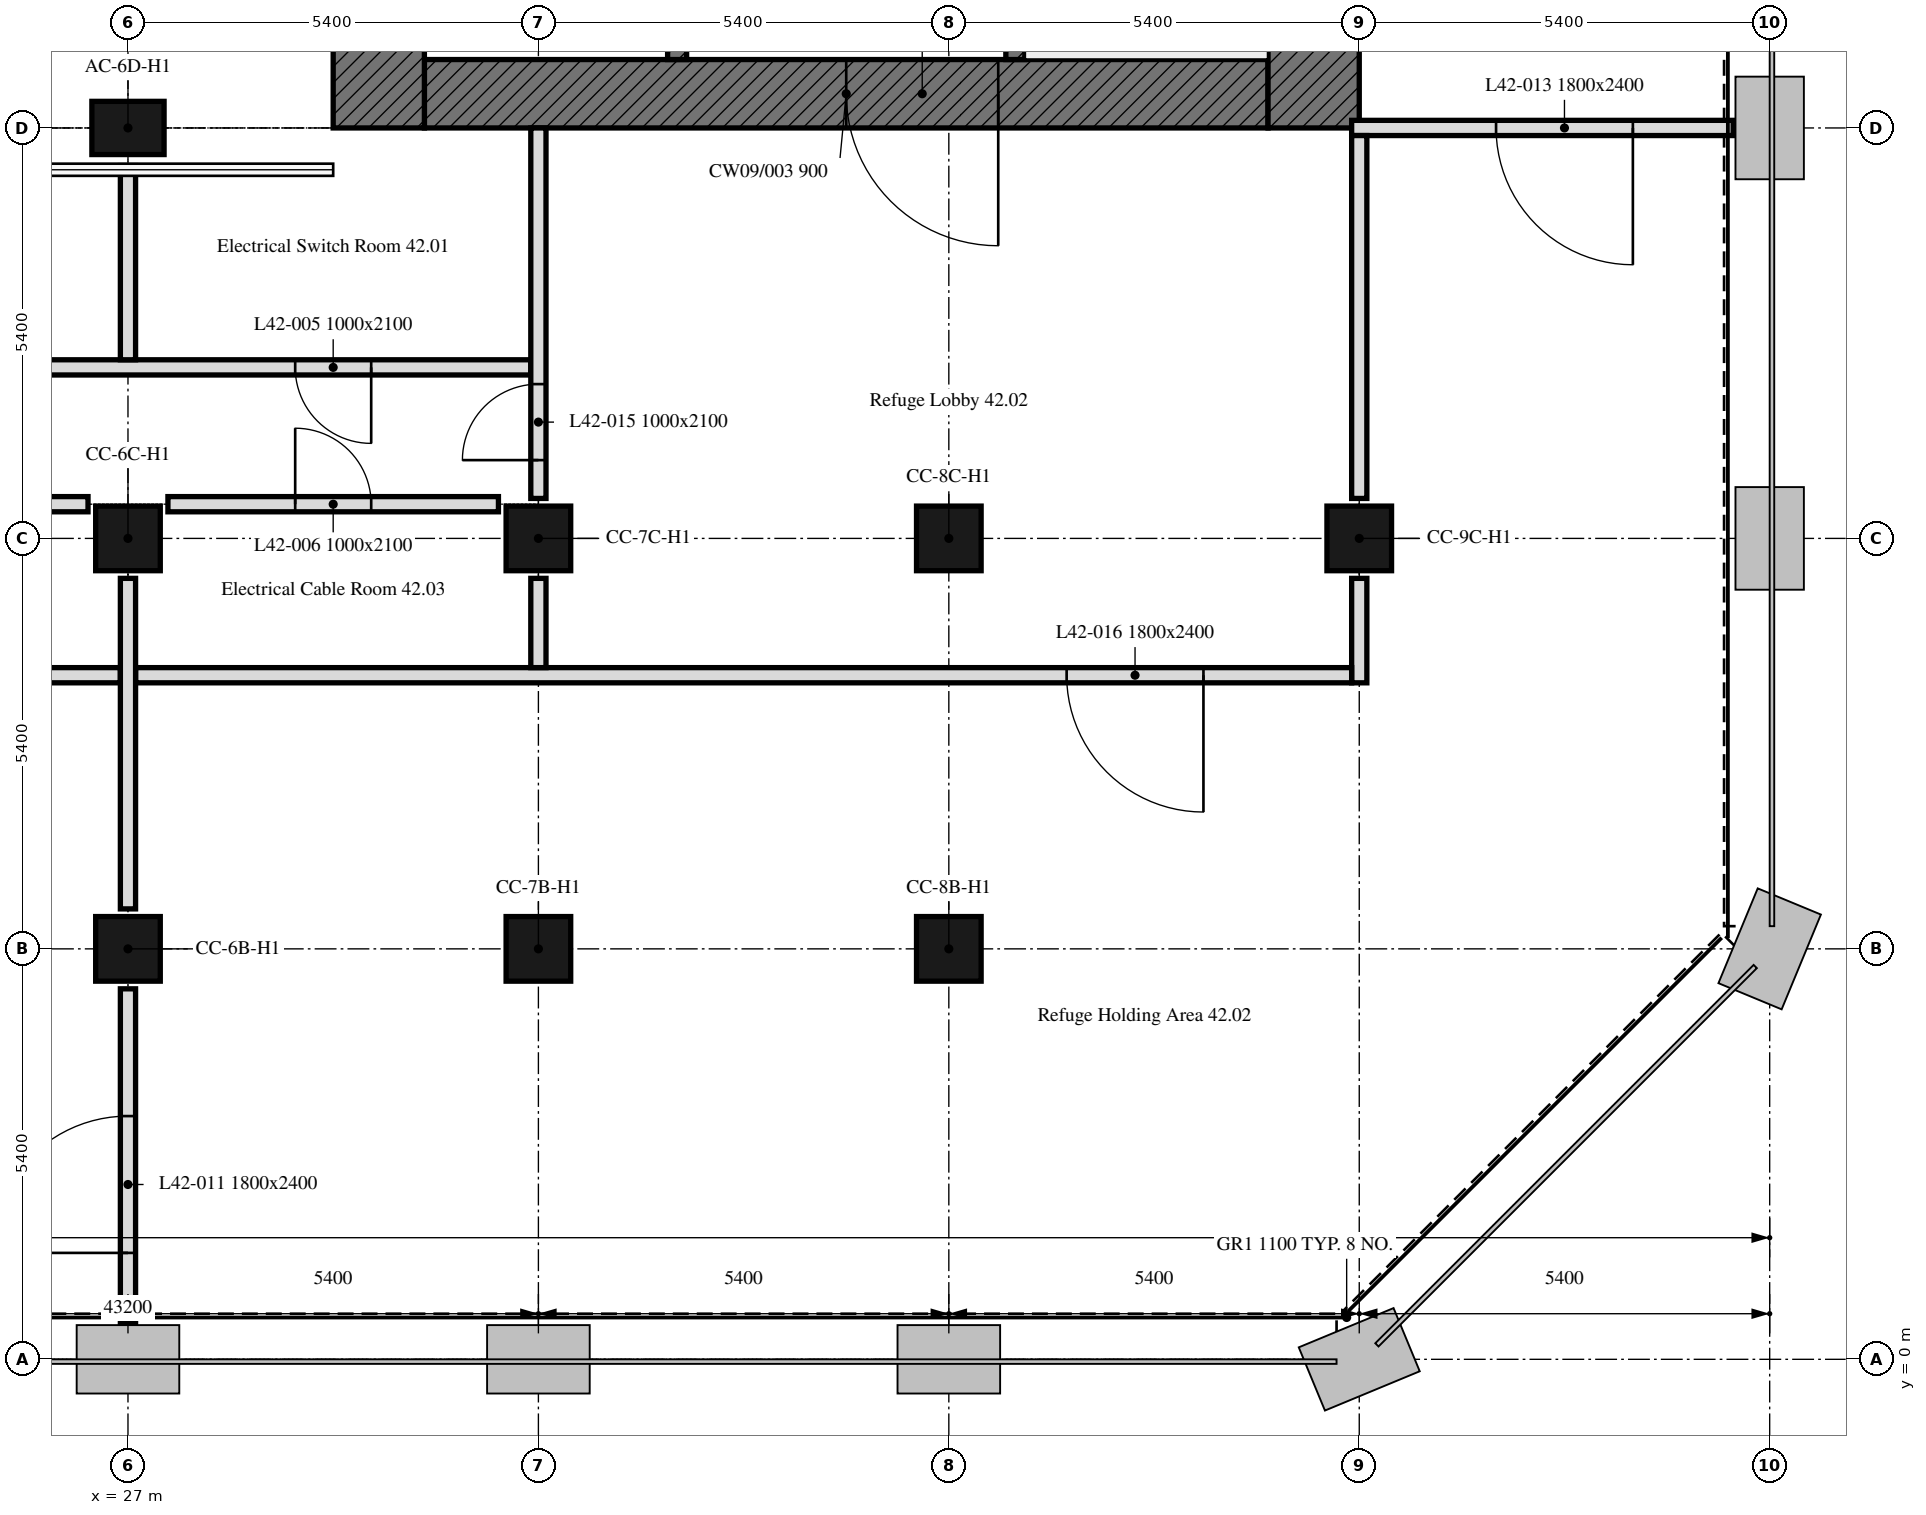
"""IFC4 building model, lengths in metres.
Left out: names, types, materials, properties, quantities, classifications, styles, units other than length and angle.
Written with IfcOpenShell. Run it as: python <this file> out.ifc"""

import sys

from ifc_helpers import new_model, si_unit, direction, frame, frame_2d, origin, origin_2d, place, context, subcontext, project, spatial, rectangle, extrude, element, fill, save


model = new_model("IFC4")
c1 = context("Model", 3, precision=1e-05, world=origin(), true_north=direction((0.0, 1.0)))
c2 = subcontext(c1, "Body", "Model", "MODEL_VIEW")
j1 = project(units=[si_unit("LENGTHUNIT", "METRE"), si_unit("PLANEANGLEUNIT", "RADIAN")], contexts=[c1])
p1 = place(None, origin())
s1 = spatial("IfcSite", under=j1, at=p1, CompositionType="ELEMENT")
p2 = place(p1, origin())
s2 = spatial("IfcBuilding", under=s1, at=p2, CompositionType="ELEMENT")
p3 = place(p2, frame((0.0, 0.0, 175.9)))
s3 = spatial("IfcBuildingStorey", under=s2, at=p3, CompositionType="ELEMENT", Elevation=175.9)
for number, where, z_axis, x_axis in (
    (1, (27.0, 5.4, 0.0), (0.0, 0.0, 1.0), (1.0, 0.0, 0.0)),
    (2, (32.4, 5.4, 0.0), (0.0, 0.0, 1.0), (1.0, 0.0, 0.0)),
    (3, (37.8, 5.4, 0.0), (0.0, 0.0, 1.0), (1.0, 0.0, 0.0)),
    (4, (27.0, 10.8, 0.0), (0.0, 0.0, 1.0), (1.0, 0.0, 0.0)),
    (5, (32.4, 10.8, 0.0), (0.0, 0.0, 1.0), (1.0, 0.0, 0.0)),
    (6, (37.8, 10.8, 0.0), (0.0, 0.0, 1.0), (1.0, 0.0, 0.0)),
    (7, (43.2, 10.8, 0.0), (0.0, 0.0, 1.0), (1.0, 0.0, 0.0)),
):
    element("IfcColumn", number, at=place(p3, frame(where, z_axis=z_axis, x_axis=x_axis)), inside=s3, PredefinedType="COLUMN", context=c2, shape_type="SweptSolid", body=[
        extrude(rectangle(XDim=0.85, YDim=0.85, at=origin_2d()), origin(), (0.0, 0.0, 1.0), 4.5),
    ])
p4 = place(p3, frame((27.0, 16.2, 0.0), z_axis=(0.0, 0.0, 1.0), x_axis=(1.0, 0.0, 0.0)))
e8 = element("IfcColumn", 8, at=p4, inside=s3, PredefinedType="COLUMN", context=c2, shape_type="SweptSolid", body=[
    extrude(rectangle(XDim=0.95, YDim=0.7, at=origin_2d()), origin(), (0.0, 0.0, 1.0), 4.5),
])
p5 = place(p3, frame((42.0, 16.65, 0.0), z_axis=(0.0, 0.0, 1.0), x_axis=(-1.0, 0.0, 0.0)))
e9 = element("IfcWall", 9, at=p5, inside=s3, PredefinedType="SOLIDWALL", context=c2, shape_type="SweptSolid", body=[
    extrude(rectangle(XDim=11.1, YDim=0.9, at=frame_2d((5.55, 0.0))), origin(), (0.0, 0.0, 1.0), 4.5),
])
p6 = place(p5, frame((3.55, 0.0, 0.0)))
e10 = element("IfcOpeningElement", 10, at=p6, cuts=e9, PredefinedType="OPENING", context=c2, shape_type="SweptSolid", body=[
    extrude(rectangle(XDim=2.0, YDim=2.4, at=frame_2d((1.0, 1.2))), frame((0.0, 0.45, 0.0), z_axis=(0.0, -1.0, 0.0), x_axis=(1.0, 0.0, 0.0)), (0.0, 0.0, 1.0), 0.9),
])
for number, where, z_axis, x_axis in (
    (11, (42.6, 32.4, 0.0), (0.0, 0.0, 1.0), (0.0, -1.0, 0.0)),
    (12, (30.3, 16.2, 0.0), (0.0, 0.0, 1.0), (0.0, 1.0, 0.0)),
):
    element("IfcWall", number, at=place(p3, frame(where, z_axis=z_axis, x_axis=x_axis)), inside=s3, PredefinedType="SOLIDWALL", context=c2, shape_type="SweptSolid", body=[
        extrude(rectangle(XDim=16.2, YDim=1.2, at=frame_2d((8.1, 0.0))), origin(), (0.0, 0.0, 1.0), 4.5),
    ])
p7 = place(p3, frame((38.675, 17.1, 0.0), z_axis=(0.0, 0.0, 1.0), x_axis=(0.0, 1.0, 0.0)))
e13 = element("IfcWall", 13, at=p7, inside=s3, PredefinedType="SOLIDWALL", context=c2, shape_type="SweptSolid", body=[
    extrude(rectangle(XDim=14.4, YDim=0.25, at=frame_2d((7.2, 0.0))), origin(), (0.0, 0.0, 1.0), 4.5),
])
p8 = place(p7, frame((4.6, 0.0, 0.0)))
e14 = element("IfcOpeningElement", 14, at=p8, cuts=e13, PredefinedType="OPENING", context=c2, shape_type="SweptSolid", body=[
    extrude(rectangle(XDim=1.0, YDim=2.1, at=frame_2d((0.5, 1.05))), frame((0.0, 0.125, 0.0), z_axis=(0.0, -1.0, 0.0), x_axis=(1.0, 0.0, 0.0)), (0.0, 0.0, 1.0), 0.25),
])
p9 = place(p7, frame((7.062, 0.0, 0.0)))
e15 = element("IfcOpeningElement", 15, at=p9, cuts=e13, PredefinedType="OPENING", context=c2, shape_type="SweptSolid", body=[
    extrude(rectangle(XDim=1.2, YDim=2.1, at=frame_2d((0.6, 1.05))), frame((0.0, 0.125, 0.0), z_axis=(0.0, -1.0, 0.0), x_axis=(1.0, 0.0, 0.0)), (0.0, 0.0, 1.0), 0.25),
])
p10 = place(p7, frame((9.853, 0.0, 0.0)))
e16 = element("IfcOpeningElement", 16, at=p10, cuts=e13, PredefinedType="OPENING", context=c2, shape_type="SweptSolid", body=[
    extrude(rectangle(XDim=0.9, YDim=2.1, at=frame_2d((0.45, 1.05))), frame((0.0, 0.125, 0.0), z_axis=(0.0, -1.0, 0.0), x_axis=(1.0, 0.0, 0.0)), (0.0, 0.0, 1.0), 0.25),
])
p11 = place(p7, frame((11.667, 0.0, 0.0)))
e17 = element("IfcOpeningElement", 17, at=p11, cuts=e13, PredefinedType="OPENING", context=c2, shape_type="SweptSolid", body=[
    extrude(rectangle(XDim=0.9, YDim=2.1, at=frame_2d((0.45, 1.05))), frame((0.0, 0.125, 0.0), z_axis=(0.0, -1.0, 0.0), x_axis=(1.0, 0.0, 0.0)), (0.0, 0.0, 1.0), 0.25),
])
p12 = place(p7, frame((13.227, 0.0, 0.0)))
e18 = element("IfcOpeningElement", 18, at=p12, cuts=e13, PredefinedType="OPENING", context=c2, shape_type="SweptSolid", body=[
    extrude(rectangle(XDim=0.9, YDim=2.1, at=frame_2d((0.45, 1.05))), frame((0.0, 0.125, 0.0), z_axis=(0.0, -1.0, 0.0), x_axis=(1.0, 0.0, 0.0)), (0.0, 0.0, 1.0), 0.25),
])
p13 = place(p3, frame((34.225, 17.1, 0.0), z_axis=(0.0, 0.0, 1.0), x_axis=(0.0, 1.0, 0.0)))
e19 = element("IfcWall", 19, at=p13, inside=s3, PredefinedType="SOLIDWALL", context=c2, shape_type="SweptSolid", body=[
    extrude(rectangle(XDim=14.4, YDim=0.25, at=frame_2d((7.2, 0.0))), origin(), (0.0, 0.0, 1.0), 4.5),
])
p14 = place(p13, frame((13.15, 0.0, 0.0)))
e20 = element("IfcOpeningElement", 20, at=p14, cuts=e19, PredefinedType="OPENING", context=c2, shape_type="SweptSolid", body=[
    extrude(rectangle(XDim=1.0, YDim=2.1, at=frame_2d((0.5, 1.05))), frame((0.0, 0.125, 0.0), z_axis=(0.0, -1.0, 0.0), x_axis=(1.0, 0.0, 0.0)), (0.0, 0.0, 1.0), 0.25),
])
p15 = place(p13, frame((3.25, 0.0, 0.0)))
e21 = element("IfcOpeningElement", 21, at=p15, cuts=e19, PredefinedType="OPENING", context=c2, shape_type="SweptSolid", body=[
    extrude(rectangle(XDim=0.9, YDim=2.1, at=frame_2d((0.45, 1.05))), frame((0.0, 0.125, 0.0), z_axis=(0.0, -1.0, 0.0), x_axis=(1.0, 0.0, 0.0)), (0.0, 0.0, 1.0), 0.25),
])
p16 = place(p3, frame((22.126, 11.25, 0.0), z_axis=(0.0, 0.0, 1.0), x_axis=(1.0, 0.0, 0.0)))
e22 = element("IfcWall", 22, at=p16, inside=s3, PredefinedType="PARTITIONING", context=c2, shape_type="SweptSolid", body=[
    extrude(rectangle(XDim=4.349, YDim=0.2, at=frame_2d((2.174, 0.0))), origin(), (0.0, 0.0, 1.0), 4.5),
])
p17 = place(p16, frame((1.674, 0.0, 0.0)))
e23 = element("IfcOpeningElement", 23, at=p17, cuts=e22, PredefinedType="OPENING", context=c2, shape_type="SweptSolid", body=[
    extrude(rectangle(XDim=1.0, YDim=2.1, at=frame_2d((0.5, 1.05))), frame((0.0, 0.1, 0.0), z_axis=(0.0, -1.0, 0.0), x_axis=(1.0, 0.0, 0.0)), (0.0, 0.0, 1.0), 0.2),
])
p18 = place(p3, frame((27.526, 11.25, 0.0), z_axis=(0.0, 0.0, 1.0), x_axis=(1.0, 0.0, 0.0)))
e24 = element("IfcWall", 24, at=p18, inside=s3, PredefinedType="PARTITIONING", context=c2, shape_type="SweptSolid", body=[
    extrude(rectangle(XDim=4.349, YDim=0.2, at=frame_2d((2.174, 0.0))), origin(), (0.0, 0.0, 1.0), 4.5),
])
p19 = place(p18, frame((1.674, 0.0, 0.0)))
e25 = element("IfcOpeningElement", 25, at=p19, cuts=e24, PredefinedType="OPENING", context=c2, shape_type="SweptSolid", body=[
    extrude(rectangle(XDim=1.0, YDim=2.1, at=frame_2d((0.5, 1.05))), frame((0.0, 0.1, 0.0), z_axis=(0.0, -1.0, 0.0), x_axis=(1.0, 0.0, 0.0)), (0.0, 0.0, 1.0), 0.2),
])
p20 = place(p3, frame((32.3, 13.05, 0.0), z_axis=(0.0, 0.0, 1.0), x_axis=(-1.0, 0.0, 0.0)))
e26 = element("IfcWall", 26, at=p20, inside=s3, PredefinedType="PARTITIONING", context=c2, shape_type="SweptSolid", body=[
    extrude(rectangle(XDim=16.0, YDim=0.2, at=frame_2d((8.0, 0.0))), origin(), (0.0, 0.0, 1.0), 3.9),
])
p21 = place(p20, frame((12.9, 0.0, 0.0)))
e27 = element("IfcOpeningElement", 27, at=p21, cuts=e26, PredefinedType="OPENING", context=c2, shape_type="SweptSolid", body=[
    extrude(rectangle(XDim=1.0, YDim=2.1, at=frame_2d((0.5, 1.05))), frame((0.0, 0.1, 0.0), z_axis=(0.0, -1.0, 0.0), x_axis=(1.0, 0.0, 0.0)), (0.0, 0.0, 1.0), 0.2),
])
p22 = place(p20, frame((7.5, 0.0, 0.0)))
e28 = element("IfcOpeningElement", 28, at=p22, cuts=e26, PredefinedType="OPENING", context=c2, shape_type="SweptSolid", body=[
    extrude(rectangle(XDim=1.0, YDim=2.1, at=frame_2d((0.5, 1.05))), frame((0.0, 0.1, 0.0), z_axis=(0.0, -1.0, 0.0), x_axis=(1.0, 0.0, 0.0)), (0.0, 0.0, 1.0), 0.2),
])
p23 = place(p20, frame((2.1, 0.0, 0.0)))
e29 = element("IfcOpeningElement", 29, at=p23, cuts=e26, PredefinedType="OPENING", context=c2, shape_type="SweptSolid", body=[
    extrude(rectangle(XDim=1.0, YDim=2.1, at=frame_2d((0.5, 1.05))), frame((0.0, 0.1, 0.0), z_axis=(0.0, -1.0, 0.0), x_axis=(1.0, 0.0, 0.0)), (0.0, 0.0, 1.0), 0.2),
])
p24 = place(p3, frame((27.0, 0.48, 0.0), z_axis=(0.0, 0.0, 1.0), x_axis=(0.0, 1.0, 0.0)))
e30 = element("IfcWall", 30, at=p24, inside=s3, PredefinedType="PARTITIONING", context=c2, shape_type="SweptSolid", body=[
    extrude(rectangle(XDim=4.394, YDim=0.2, at=frame_2d((2.197, 0.0))), origin(), (0.0, 0.0, 1.0), 3.9),
])
p25 = place(p24, frame((0.92, 0.0, 0.0)))
e31 = element("IfcOpeningElement", 31, at=p25, cuts=e30, PredefinedType="OPENING", context=c2, shape_type="SweptSolid", body=[
    extrude(rectangle(XDim=1.8, YDim=2.4, at=frame_2d((0.9, 1.2))), frame((0.0, 0.1, 0.0), z_axis=(0.0, -1.0, 0.0), x_axis=(1.0, 0.0, 0.0)), (0.0, 0.0, 1.0), 0.2),
])
p26 = place(p3, frame((26.9, 9.0, 0.0), z_axis=(0.0, 0.0, 1.0), x_axis=(-1.0, 0.0, 0.0)))
e32 = element("IfcWall", 32, at=p26, inside=s3, PredefinedType="PARTITIONING", context=c2, shape_type="SweptSolid", body=[
    extrude(rectangle(XDim=21.25, YDim=0.2, at=frame_2d((10.625, 0.0))), origin(), (0.0, 0.0, 1.0), 3.9),
])
p27 = place(p26, frame((12.75, 0.0, 0.0)))
e33 = element("IfcOpeningElement", 33, at=p27, cuts=e32, PredefinedType="OPENING", context=c2, shape_type="SweptSolid", body=[
    extrude(rectangle(XDim=1.8, YDim=2.4, at=frame_2d((0.9, 1.2))), frame((0.0, 0.1, 0.0), z_axis=(0.0, -1.0, 0.0), x_axis=(1.0, 0.0, 0.0)), (0.0, 0.0, 1.0), 0.2),
])
p28 = place(p3, frame((48.12, 16.2, 0.0), z_axis=(0.0, 0.0, 1.0), x_axis=(-1.0, 0.0, 0.0)))
e34 = element("IfcWall", 34, at=p28, inside=s3, PredefinedType="PARTITIONING", context=c2, shape_type="SweptSolid", body=[
    extrude(rectangle(XDim=5.02, YDim=0.2, at=frame_2d((2.51, 0.0))), origin(), (0.0, 0.0, 1.0), 3.9),
])
p29 = place(p28, frame((1.32, 0.0, 0.0)))
e35 = element("IfcOpeningElement", 35, at=p29, cuts=e34, PredefinedType="OPENING", context=c2, shape_type="SweptSolid", body=[
    extrude(rectangle(XDim=1.8, YDim=2.4, at=frame_2d((0.9, 1.2))), frame((0.0, 0.1, 0.0), z_axis=(0.0, -1.0, 0.0), x_axis=(1.0, 0.0, 0.0)), (0.0, 0.0, 1.0), 0.2),
])
p30 = place(p3, frame((43.2, 16.1, 0.0), z_axis=(0.0, 0.0, 1.0), x_axis=(0.0, -1.0, 0.0)))
e36 = element("IfcWall", 36, at=p30, inside=s3, PredefinedType="PARTITIONING", context=c2, shape_type="SweptSolid", body=[
    extrude(rectangle(XDim=4.774, YDim=0.2, at=frame_2d((2.387, 0.0))), origin(), (0.0, 0.0, 1.0), 4.5),
])
p31 = place(p3, frame((43.2, 10.274, 0.0), z_axis=(0.0, 0.0, 1.0), x_axis=(0.0, -1.0, 0.0)))
e37 = element("IfcWall", 37, at=p31, inside=s3, PredefinedType="PARTITIONING", context=c2, shape_type="SweptSolid", body=[
    extrude(rectangle(XDim=1.375, YDim=0.2, at=frame_2d((0.687, 0.0))), origin(), (0.0, 0.0, 1.0), 4.5),
])
p32 = place(p3, frame((43.1, 9.0, 0.0), z_axis=(0.0, 0.0, 1.0), x_axis=(-1.0, 0.0, 0.0)))
e38 = element("IfcWall", 38, at=p32, inside=s3, PredefinedType="PARTITIONING", context=c2, shape_type="SweptSolid", body=[
    extrude(rectangle(XDim=16.0, YDim=0.2, at=frame_2d((8.0, 0.0))), origin(), (0.0, 0.0, 1.0), 3.9),
])
p33 = place(p32, frame((1.95, 0.0, 0.0)))
e39 = element("IfcOpeningElement", 39, at=p33, cuts=e38, PredefinedType="OPENING", context=c2, shape_type="SweptSolid", body=[
    extrude(rectangle(XDim=1.8, YDim=2.4, at=frame_2d((0.9, 1.2))), frame((0.0, 0.1, 0.0), z_axis=(0.0, -1.0, 0.0), x_axis=(1.0, 0.0, 0.0)), (0.0, 0.0, 1.0), 0.2),
])
p34 = place(p3, frame((32.4, 11.326, 0.0), z_axis=(0.0, 0.0, 1.0), x_axis=(0.0, 1.0, 0.0)))
e40 = element("IfcWall", 40, at=p34, inside=s3, PredefinedType="PARTITIONING", context=c2, shape_type="SweptSolid", body=[
    extrude(rectangle(XDim=4.874, YDim=0.2, at=frame_2d((2.437, 0.0))), origin(), (0.0, 0.0, 1.0), 3.9),
])
p35 = place(p34, frame((0.504, 0.0, 0.0)))
e41 = element("IfcOpeningElement", 41, at=p35, cuts=e40, PredefinedType="OPENING", context=c2, shape_type="SweptSolid", body=[
    extrude(rectangle(XDim=1.0, YDim=2.1, at=frame_2d((0.5, 1.05))), frame((0.0, 0.1, 0.0), z_axis=(0.0, -1.0, 0.0), x_axis=(1.0, 0.0, 0.0)), (0.0, 0.0, 1.0), 0.2),
])
p36 = place(p3, frame((32.4, 10.274, 0.0), z_axis=(0.0, 0.0, 1.0), x_axis=(0.0, -1.0, 0.0)))
e42 = element("IfcWall", 42, at=p36, inside=s3, PredefinedType="PARTITIONING", context=c2, shape_type="SweptSolid", body=[
    extrude(rectangle(XDim=1.174, YDim=0.2, at=frame_2d((0.587, 0.0))), origin(), (0.0, 0.0, 1.0), 3.9),
])
p37 = place(p3, frame((27.0, 13.15, 0.0), z_axis=(0.0, 0.0, 1.0), x_axis=(0.0, 1.0, 0.0)))
e43 = element("IfcWall", 43, at=p37, inside=s3, PredefinedType="PARTITIONING", context=c2, shape_type="SweptSolid", body=[
    extrude(rectangle(XDim=2.555, YDim=0.2, at=frame_2d((1.278, 0.0))), origin(), (0.0, 0.0, 1.0), 3.9),
])
p38 = place(p3, frame((27.0, 5.926, 0.0), z_axis=(0.0, 0.0, 1.0), x_axis=(0.0, 1.0, 0.0)))
e44 = element("IfcWall", 44, at=p38, inside=s3, PredefinedType="PARTITIONING", context=c2, shape_type="SweptSolid", body=[
    extrude(rectangle(XDim=4.349, YDim=0.2, at=frame_2d((2.174, 0.0))), origin(), (0.0, 0.0, 1.0), 3.9),
])
p39 = place(p6, origin())
e45 = element("IfcDoor", 45, at=p39, inside=s3, OperationType="DOUBLE_DOOR_SINGLE_SWING", PredefinedType="DOOR", context=c2, shape_type="SweptSolid", body=[
    extrude(rectangle(XDim=2.0, YDim=2.4, at=frame_2d((1.0, 1.2))), frame((0.0, 0.025, 0.0), z_axis=(0.0, -1.0, 0.0), x_axis=(1.0, 0.0, 0.0)), (0.0, 0.0, 1.0), 0.05),
])
fill(e10, e45)
p40 = place(p23, origin())
e46 = element("IfcDoor", 46, at=p40, inside=s3, OperationType="SINGLE_SWING_LEFT", PredefinedType="DOOR", context=c2, shape_type="SweptSolid", body=[
    extrude(rectangle(XDim=1.0, YDim=2.1, at=frame_2d((0.5, 1.05))), frame((0.0, 0.025, 0.0), z_axis=(0.0, -1.0, 0.0), x_axis=(1.0, 0.0, 0.0)), (0.0, 0.0, 1.0), 0.05),
])
fill(e29, e46)
p41 = place(p19, origin())
e47 = element("IfcDoor", 47, at=p41, inside=s3, OperationType="SINGLE_SWING_LEFT", PredefinedType="DOOR", context=c2, shape_type="SweptSolid", body=[
    extrude(rectangle(XDim=1.0, YDim=2.1, at=frame_2d((0.5, 1.05))), frame((0.0, 0.025, 0.0), z_axis=(0.0, -1.0, 0.0), x_axis=(1.0, 0.0, 0.0)), (0.0, 0.0, 1.0), 0.05),
])
fill(e25, e47)
p42 = place(p25, origin())
e48 = element("IfcDoor", 48, at=p42, inside=s3, OperationType="DOUBLE_DOOR_SINGLE_SWING", PredefinedType="DOOR", context=c2, shape_type="SweptSolid", body=[
    extrude(rectangle(XDim=1.8, YDim=2.4, at=frame_2d((0.9, 1.2))), frame((0.0, 0.025, 0.0), z_axis=(0.0, -1.0, 0.0), x_axis=(1.0, 0.0, 0.0)), (0.0, 0.0, 1.0), 0.05),
])
fill(e31, e48)
p43 = place(p29, origin())
e49 = element("IfcDoor", 49, at=p43, inside=s3, OperationType="DOUBLE_DOOR_SINGLE_SWING", PredefinedType="DOOR", context=c2, shape_type="SweptSolid", body=[
    extrude(rectangle(XDim=1.8, YDim=2.4, at=frame_2d((0.9, 1.2))), frame((0.0, 0.025, 0.0), z_axis=(0.0, -1.0, 0.0), x_axis=(1.0, 0.0, 0.0)), (0.0, 0.0, 1.0), 0.05),
])
fill(e35, e49)
p44 = place(p35, origin())
e50 = element("IfcDoor", 50, at=p44, inside=s3, OperationType="SINGLE_SWING_RIGHT", PredefinedType="DOOR", context=c2, shape_type="SweptSolid", body=[
    extrude(rectangle(XDim=1.0, YDim=2.1, at=frame_2d((0.5, 1.05))), frame((0.0, 0.025, 0.0), z_axis=(0.0, -1.0, 0.0), x_axis=(1.0, 0.0, 0.0)), (0.0, 0.0, 1.0), 0.05),
])
fill(e41, e50)
p45 = place(p33, origin())
e51 = element("IfcDoor", 51, at=p45, inside=s3, OperationType="DOUBLE_DOOR_SINGLE_SWING", PredefinedType="DOOR", context=c2, shape_type="SweptSolid", body=[
    extrude(rectangle(XDim=1.8, YDim=2.4, at=frame_2d((0.9, 1.2))), frame((0.0, 0.025, 0.0), z_axis=(0.0, -1.0, 0.0), x_axis=(1.0, 0.0, 0.0)), (0.0, 0.0, 1.0), 0.05),
])
fill(e39, e51)
save(model, sys.argv[1])
